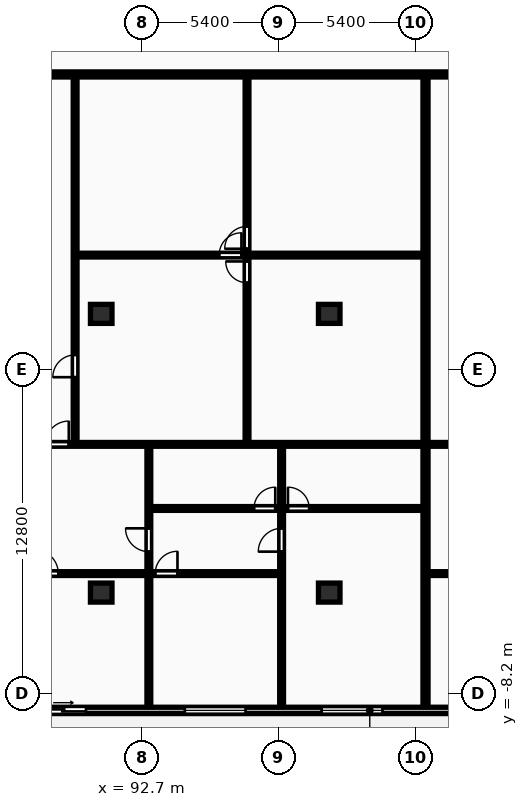
"""IFC4 building model, lengths in metres.
Left out: names, types, materials, properties, quantities, classifications, styles, units other than length and angle.
Written with IfcOpenShell. Run it as: python <this file> out.ifc"""

import sys

from ifc_helpers import new_model, si_unit, direction, frame, frame_2d, origin, origin_2d, place, context, subcontext, project, spatial, rectangle, extrude, element, fill, save


model = new_model("IFC4")
c1 = context("Model", 3, precision=1e-05, world=origin(), true_north=direction((0.0, 1.0)))
c2 = subcontext(c1, "Body", "Model", "MODEL_VIEW")
j1 = project(units=[si_unit("LENGTHUNIT", "METRE"), si_unit("PLANEANGLEUNIT", "RADIAN")], contexts=[c1])
p1 = place(None, origin())
s1 = spatial("IfcSite", under=j1, at=p1, CompositionType="ELEMENT")
p2 = place(p1, origin())
s2 = spatial("IfcBuilding", under=s1, at=p2, CompositionType="ELEMENT")
p3 = place(p2, frame((0.0, 0.0, 80.8)))
s3 = spatial("IfcBuildingStorey", under=s2, at=p3, CompositionType="ELEMENT", Elevation=80.8)
for number, where, z_axis, x_axis in (
    (1, (91.1, -4.2, 0.0), (0.0, 0.0, 1.0), (1.0, 0.0, 0.0)),
    (2, (91.1, 6.8, 0.0), (0.0, 0.0, 1.0), (1.0, 0.0, 0.0)),
    (3, (100.1, -4.2, 0.0), (0.0, 0.0, 1.0), (1.0, 0.0, 0.0)),
    (4, (100.1, 6.8, 0.0), (0.0, 0.0, 1.0), (1.0, 0.0, 0.0)),
):
    element("IfcColumn", number, at=place(p3, frame(where, z_axis=z_axis, x_axis=x_axis)), inside=s3, PredefinedType="COLUMN", context=c2, shape_type="SweptSolid", body=[
        extrude(rectangle(XDim=0.85, YDim=0.75, at=origin_2d()), origin(), (0.0, 0.0, 1.0), 3.25),
    ])
p4 = place(p3, frame((72.7, -8.85, 0.0), z_axis=(0.0, 0.0, 1.0), x_axis=(1.0, 0.0, 0.0)))
e5 = element("IfcWall", 5, at=p4, inside=s3, PredefinedType="STANDARD", context=c2, shape_type="SweptSolid", body=[
    extrude(rectangle(XDim=58.0, YDim=0.25, at=frame_2d((29.0, 0.0))), origin(), (0.0, 0.0, 1.0), 2.97),
])
p5 = place(p4, frame((2.92, 0.0, 0.0)))
e6 = element("IfcOpeningElement", 6, at=p5, cuts=e5, PredefinedType="OPENING", context=c2, shape_type="SweptSolid", body=[
    extrude(rectangle(XDim=1.8, YDim=2.2, at=frame_2d((0.9, 1.1))), frame((0.0, 0.135, 0.0), z_axis=(0.0, -1.0, 0.0), x_axis=(1.0, 0.0, 0.0)), (0.0, 0.0, 1.0), 0.27),
])
p6 = place(p4, frame((9.2, 0.0, 0.85)))
e7 = element("IfcOpeningElement", 7, at=p6, cuts=e5, PredefinedType="OPENING", context=c2, shape_type="SweptSolid", body=[
    extrude(rectangle(XDim=2.4, YDim=1.9, at=frame_2d((1.2, 0.95))), frame((0.0, 0.135, 0.0), z_axis=(0.0, -1.0, 0.0), x_axis=(1.0, 0.0, 0.0)), (0.0, 0.0, 1.0), 0.27),
])
p7 = place(p4, frame((21.7, 0.0, 0.85)))
e8 = element("IfcOpeningElement", 8, at=p7, cuts=e5, PredefinedType="OPENING", context=c2, shape_type="SweptSolid", body=[
    extrude(rectangle(XDim=2.4, YDim=1.9, at=frame_2d((1.2, 0.95))), frame((0.0, 0.135, 0.0), z_axis=(0.0, -1.0, 0.0), x_axis=(1.0, 0.0, 0.0)), (0.0, 0.0, 1.0), 0.27),
])
p8 = place(p4, frame((16.0, 0.0, 0.0)))
e9 = element("IfcOpeningElement", 9, at=p8, cuts=e5, PredefinedType="OPENING", context=c2, shape_type="SweptSolid", body=[
    extrude(rectangle(XDim=1.8, YDim=2.2, at=frame_2d((0.9, 1.1))), frame((0.0, 0.135, 0.0), z_axis=(0.0, -1.0, 0.0), x_axis=(1.0, 0.0, 0.0)), (0.0, 0.0, 1.0), 0.27),
])
p9 = place(p4, frame((27.1, 0.0, 0.85)))
e10 = element("IfcOpeningElement", 10, at=p9, cuts=e5, PredefinedType="OPENING", context=c2, shape_type="SweptSolid", body=[
    extrude(rectangle(XDim=2.4, YDim=1.9, at=frame_2d((1.2, 0.95))), frame((0.0, 0.135, 0.0), z_axis=(0.0, -1.0, 0.0), x_axis=(1.0, 0.0, 0.0)), (0.0, 0.0, 1.0), 0.27),
])
p10 = place(p4, frame((35.85, 0.0, 0.0)))
e11 = element("IfcOpeningElement", 11, at=p10, cuts=e5, PredefinedType="OPENING", context=c2, shape_type="SweptSolid", body=[
    extrude(rectangle(XDim=1.8, YDim=2.2, at=frame_2d((0.9, 1.1))), frame((0.0, 0.135, 0.0), z_axis=(0.0, -1.0, 0.0), x_axis=(1.0, 0.0, 0.0)), (0.0, 0.0, 1.0), 0.27),
])
p11 = place(p4, frame((42.93, 0.0, 0.85)))
e12 = element("IfcOpeningElement", 12, at=p11, cuts=e5, PredefinedType="OPENING", context=c2, shape_type="SweptSolid", body=[
    extrude(rectangle(XDim=1.8, YDim=1.8, at=frame_2d((0.9, 0.9))), frame((0.0, 0.135, 0.0), z_axis=(0.0, -1.0, 0.0), x_axis=(1.0, 0.0, 0.0)), (0.0, 0.0, 1.0), 0.27),
])
p12 = place(p4, frame((49.12, 0.0, 0.0)))
e13 = element("IfcOpeningElement", 13, at=p12, cuts=e5, PredefinedType="OPENING", context=c2, shape_type="SweptSolid", body=[
    extrude(rectangle(XDim=1.8, YDim=2.2, at=frame_2d((0.9, 1.1))), frame((0.0, 0.135, 0.0), z_axis=(0.0, -1.0, 0.0), x_axis=(1.0, 0.0, 0.0)), (0.0, 0.0, 1.0), 0.27),
])
p13 = place(p4, frame((54.9, 0.0, 0.85)))
e14 = element("IfcOpeningElement", 14, at=p13, cuts=e5, PredefinedType="OPENING", context=c2, shape_type="SweptSolid", body=[
    extrude(rectangle(XDim=2.4, YDim=1.9, at=frame_2d((1.2, 0.95))), frame((0.0, 0.135, 0.0), z_axis=(0.0, -1.0, 0.0), x_axis=(1.0, 0.0, 0.0)), (0.0, 0.0, 1.0), 0.27),
])
p14 = place(p3, frame((103.9, -8.7, 0.0), z_axis=(0.0, 0.0, 1.0), x_axis=(0.0, 1.0, 0.0)))
e15 = element("IfcWall", 15, at=p14, inside=s3, PredefinedType="PARTITIONING", context=c2, shape_type="SweptSolid", body=[
    extrude(rectangle(XDim=24.87, YDim=0.2, at=frame_2d((12.435, 0.0))), origin(), (0.0, 0.0, 1.0), 2.97),
])
p15 = place(p3, frame((96.855, 1.69, 0.0), z_axis=(0.0, 0.0, 1.0), x_axis=(0.0, 1.0, 0.0)))
e16 = element("IfcWall", 16, at=p15, inside=s3, PredefinedType="PARTITIONING", context=c2, shape_type="SweptSolid", body=[
    extrude(rectangle(XDim=14.5, YDim=0.15, at=frame_2d((7.25, 0.0))), origin(), (0.0, 0.0, 1.0), 2.97),
])
p16 = place(p15, frame((6.34, 0.0, 0.0)))
e17 = element("IfcOpeningElement", 17, at=p16, cuts=e16, PredefinedType="OPENING", context=c2, shape_type="SweptSolid", body=[
    extrude(rectangle(XDim=0.84, YDim=2.04, at=frame_2d((0.42, 1.02))), frame((0.0, 0.085, 0.0), z_axis=(0.0, -1.0, 0.0), x_axis=(1.0, 0.0, 0.0)), (0.0, 0.0, 1.0), 0.17),
])
p17 = place(p15, frame((7.68, 0.0, 0.0)))
e18 = element("IfcOpeningElement", 18, at=p17, cuts=e16, PredefinedType="OPENING", context=c2, shape_type="SweptSolid", body=[
    extrude(rectangle(XDim=0.88, YDim=2.06, at=frame_2d((0.44, 1.03))), frame((0.0, 0.085, 0.0), z_axis=(0.0, -1.0, 0.0), x_axis=(1.0, 0.0, 0.0)), (0.0, 0.0, 1.0), 0.17),
])
p18 = place(p3, frame((90.13, 9.12, 0.0), z_axis=(0.0, 0.0, 1.0), x_axis=(1.0, 0.0, 0.0)))
e19 = element("IfcWall", 19, at=p18, inside=s3, PredefinedType="PARTITIONING", context=c2, shape_type="SweptSolid", body=[
    extrude(rectangle(XDim=13.69, YDim=0.15, at=frame_2d((6.845, 0.0))), origin(), (0.0, 0.0, 1.0), 2.97),
])
p19 = place(p18, frame((5.625, 0.0, 0.0)))
e20 = element("IfcOpeningElement", 20, at=p19, cuts=e19, PredefinedType="OPENING", context=c2, shape_type="SweptSolid", body=[
    extrude(rectangle(XDim=0.88, YDim=2.06, at=frame_2d((0.44, 1.03))), frame((0.0, 0.085, 0.0), z_axis=(0.0, -1.0, 0.0), x_axis=(1.0, 0.0, 0.0)), (0.0, 0.0, 1.0), 0.17),
])
p20 = place(p3, frame((90.07, 1.69, 0.0), z_axis=(0.0, 0.0, 1.0), x_axis=(0.0, 1.0, 0.0)))
e21 = element("IfcWall", 21, at=p20, inside=s3, PredefinedType="PARTITIONING", context=c2, shape_type="SweptSolid", body=[
    extrude(rectangle(XDim=14.5, YDim=0.15, at=frame_2d((7.25, 0.0))), origin(), (0.0, 0.0, 1.0), 2.97),
])
p21 = place(p20, frame((2.611, 0.0, 0.0)))
e22 = element("IfcOpeningElement", 22, at=p21, cuts=e21, PredefinedType="OPENING", context=c2, shape_type="SweptSolid", body=[
    extrude(rectangle(XDim=0.88, YDim=2.06, at=frame_2d((0.44, 1.03))), frame((0.0, 0.085, 0.0), z_axis=(0.0, -1.0, 0.0), x_axis=(1.0, 0.0, 0.0)), (0.0, 0.0, 1.0), 0.17),
])
p22 = place(p3, frame((92.98, -8.7, 0.0), z_axis=(0.0, 0.0, 1.0), x_axis=(0.0, 1.0, 0.0)))
e23 = element("IfcWall", 23, at=p22, inside=s3, PredefinedType="PARTITIONING", context=c2, shape_type="SweptSolid", body=[
    extrude(rectangle(XDim=10.31, YDim=0.15, at=frame_2d((5.155, 0.0))), origin(), (0.0, 0.0, 1.0), 2.97),
])
p23 = place(p22, frame((6.116, 0.0, 0.0)))
e24 = element("IfcOpeningElement", 24, at=p23, cuts=e23, PredefinedType="OPENING", context=c2, shape_type="SweptSolid", body=[
    extrude(rectangle(XDim=0.92, YDim=2.08, at=frame_2d((0.46, 1.04))), frame((0.0, 0.085, 0.0), z_axis=(0.0, -1.0, 0.0), x_axis=(1.0, 0.0, 0.0)), (0.0, 0.0, 1.0), 0.17),
])
p24 = place(p3, frame((98.22, -0.86, 0.0), z_axis=(0.0, 0.0, 1.0), x_axis=(0.0, 1.0, 0.0)))
e25 = element("IfcWall", 25, at=p24, inside=s3, PredefinedType="PARTITIONING", context=c2, shape_type="SweptSolid", body=[
    extrude(rectangle(XDim=2.47, YDim=0.15, at=frame_2d((1.235, 0.0))), origin(), (0.0, 0.0, 1.0), 2.97),
])
p25 = place(p3, frame((98.22, -8.7, 0.0), z_axis=(0.0, 0.0, 1.0), x_axis=(0.0, 1.0, 0.0)))
e26 = element("IfcWall", 26, at=p25, inside=s3, PredefinedType="PARTITIONING", context=c2, shape_type="SweptSolid", body=[
    extrude(rectangle(XDim=7.8, YDim=0.15, at=frame_2d((3.9, 0.0))), origin(), (0.0, 0.0, 1.0), 2.97),
])
p26 = place(p25, frame((6.116, 0.0, 0.0)))
e27 = element("IfcOpeningElement", 27, at=p26, cuts=e26, PredefinedType="OPENING", context=c2, shape_type="SweptSolid", body=[
    extrude(rectangle(XDim=0.92, YDim=2.08, at=frame_2d((0.46, 1.04))), frame((0.0, 0.085, 0.0), z_axis=(0.0, -1.0, 0.0), x_axis=(1.0, 0.0, 0.0)), (0.0, 0.0, 1.0), 0.17),
])
p27 = place(p3, frame((93.02, -0.88, 0.0), z_axis=(0.0, 0.0, 1.0), x_axis=(1.0, 0.0, 0.0)))
e28 = element("IfcWall", 28, at=p27, inside=s3, PredefinedType="PARTITIONING", context=c2, shape_type="SweptSolid", body=[
    extrude(rectangle(XDim=10.8, YDim=0.15, at=frame_2d((5.4, 0.0))), origin(), (0.0, 0.0, 1.0), 2.97),
])
p28 = place(p27, frame((4.11, 0.0, 0.0)))
e29 = element("IfcOpeningElement", 29, at=p28, cuts=e28, PredefinedType="OPENING", context=c2, shape_type="SweptSolid", body=[
    extrude(rectangle(XDim=0.84, YDim=2.04, at=frame_2d((0.42, 1.02))), frame((0.0, 0.085, 0.0), z_axis=(0.0, -1.0, 0.0), x_axis=(1.0, 0.0, 0.0)), (0.0, 0.0, 1.0), 0.17),
])
p29 = place(p27, frame((5.45, 0.0, 0.0)))
e30 = element("IfcOpeningElement", 30, at=p29, cuts=e28, PredefinedType="OPENING", context=c2, shape_type="SweptSolid", body=[
    extrude(rectangle(XDim=0.84, YDim=2.04, at=frame_2d((0.42, 1.02))), frame((0.0, 0.085, 0.0), z_axis=(0.0, -1.0, 0.0), x_axis=(1.0, 0.0, 0.0)), (0.0, 0.0, 1.0), 0.17),
])
p30 = place(p3, frame((86.18, 1.65, 0.0), z_axis=(0.0, 0.0, 1.0), x_axis=(1.0, 0.0, 0.0)))
e31 = element("IfcWall", 31, at=p30, inside=s3, PredefinedType="PARTITIONING", context=c2, shape_type="SweptSolid", body=[
    extrude(rectangle(XDim=17.64, YDim=0.15, at=frame_2d((8.82, 0.0))), origin(), (0.0, 0.0, 1.0), 2.97),
])
p31 = place(p30, frame((2.72, 0.0, 0.0)))
e32 = element("IfcOpeningElement", 32, at=p31, cuts=e31, PredefinedType="OPENING", context=c2, shape_type="SweptSolid", body=[
    extrude(rectangle(XDim=0.92, YDim=2.08, at=frame_2d((0.46, 1.04))), frame((0.0, 0.085, 0.0), z_axis=(0.0, -1.0, 0.0), x_axis=(1.0, 0.0, 0.0)), (0.0, 0.0, 1.0), 0.17),
])
p32 = place(p3, frame((86.18, -3.45, 0.0), z_axis=(0.0, 0.0, 1.0), x_axis=(1.0, 0.0, 0.0)))
e33 = element("IfcWall", 33, at=p32, inside=s3, PredefinedType="PARTITIONING", context=c2, shape_type="SweptSolid", body=[
    extrude(rectangle(XDim=12.04, YDim=0.15, at=frame_2d((6.02, 0.0))), origin(), (0.0, 0.0, 1.0), 2.97),
])
p33 = place(p32, frame((2.287, 0.0, 0.0)))
e34 = element("IfcOpeningElement", 34, at=p33, cuts=e33, PredefinedType="OPENING", context=c2, shape_type="SweptSolid", body=[
    extrude(rectangle(XDim=0.94, YDim=2.1, at=frame_2d((0.47, 1.05))), frame((0.0, 0.085, 0.0), z_axis=(0.0, -1.0, 0.0), x_axis=(1.0, 0.0, 0.0)), (0.0, 0.0, 1.0), 0.17),
])
p34 = place(p32, frame((7.05, 0.0, 0.0)))
e35 = element("IfcOpeningElement", 35, at=p34, cuts=e33, PredefinedType="OPENING", context=c2, shape_type="SweptSolid", body=[
    extrude(rectangle(XDim=0.88, YDim=2.06, at=frame_2d((0.44, 1.03))), frame((0.0, 0.085, 0.0), z_axis=(0.0, -1.0, 0.0), x_axis=(1.0, 0.0, 0.0)), (0.0, 0.0, 1.0), 0.17),
])
p35 = place(p3, frame((103.98, 1.65, 0.0), z_axis=(0.0, 0.0, 1.0), x_axis=(1.0, 0.0, 0.0)))
e36 = element("IfcWall", 36, at=p35, inside=s3, PredefinedType="PARTITIONING", context=c2, shape_type="SweptSolid", body=[
    extrude(rectangle(XDim=14.24, YDim=0.15, at=frame_2d((7.12, 0.0))), origin(), (0.0, 0.0, 1.0), 2.97),
])
p36 = place(p35, frame((2.72, 0.0, 0.0)))
e37 = element("IfcOpeningElement", 37, at=p36, cuts=e36, PredefinedType="OPENING", context=c2, shape_type="SweptSolid", body=[
    extrude(rectangle(XDim=0.92, YDim=2.08, at=frame_2d((0.46, 1.04))), frame((0.0, 0.085, 0.0), z_axis=(0.0, -1.0, 0.0), x_axis=(1.0, 0.0, 0.0)), (0.0, 0.0, 1.0), 0.17),
])
p37 = place(p3, frame((103.98, -3.45, 0.0), z_axis=(0.0, 0.0, 1.0), x_axis=(1.0, 0.0, 0.0)))
e38 = element("IfcWall", 38, at=p37, inside=s3, PredefinedType="PARTITIONING", context=c2, shape_type="SweptSolid", body=[
    extrude(rectangle(XDim=14.24, YDim=0.15, at=frame_2d((7.12, 0.0))), origin(), (0.0, 0.0, 1.0), 2.97),
])
p38 = place(p37, frame((6.872, 0.0, 0.0)))
e39 = element("IfcOpeningElement", 39, at=p38, cuts=e38, PredefinedType="OPENING", context=c2, shape_type="SweptSolid", body=[
    extrude(rectangle(XDim=0.94, YDim=2.1, at=frame_2d((0.47, 1.05))), frame((0.0, 0.085, 0.0), z_axis=(0.0, -1.0, 0.0), x_axis=(1.0, 0.0, 0.0)), (0.0, 0.0, 1.0), 0.17),
])
p39 = place(p3, frame((72.7, 16.25, 0.0), z_axis=(0.0, 0.0, 1.0), x_axis=(1.0, 0.0, 0.0)))
e40 = element("IfcWall", 40, at=p39, inside=s3, PredefinedType="PARTITIONING", context=c2, shape_type="SweptSolid", body=[
    extrude(rectangle(XDim=58.0, YDim=0.2, at=frame_2d((29.0, 0.0))), origin(), (0.0, 0.0, 1.0), 2.97),
])
p40 = place(p39, frame((2.77, 0.0, 0.0)))
e41 = element("IfcOpeningElement", 41, at=p40, cuts=e40, PredefinedType="OPENING", context=c2, shape_type="SweptSolid", body=[
    extrude(rectangle(XDim=0.95, YDim=2.15, at=frame_2d((0.475, 1.075))), frame((0.0, 0.11, 0.0), z_axis=(0.0, -1.0, 0.0), x_axis=(1.0, 0.0, 0.0)), (0.0, 0.0, 1.0), 0.22),
])
p41 = place(p39, frame((15.445, 0.0, 0.0)))
e42 = element("IfcOpeningElement", 42, at=p41, cuts=e40, PredefinedType="OPENING", context=c2, shape_type="SweptSolid", body=[
    extrude(rectangle(XDim=0.95, YDim=2.15, at=frame_2d((0.475, 1.075))), frame((0.0, 0.11, 0.0), z_axis=(0.0, -1.0, 0.0), x_axis=(1.0, 0.0, 0.0)), (0.0, 0.0, 1.0), 0.22),
])
p42 = place(p39, frame((33.245, 0.0, 0.0)))
e43 = element("IfcOpeningElement", 43, at=p42, cuts=e40, PredefinedType="OPENING", context=c2, shape_type="SweptSolid", body=[
    extrude(rectangle(XDim=0.95, YDim=2.15, at=frame_2d((0.475, 1.075))), frame((0.0, 0.11, 0.0), z_axis=(0.0, -1.0, 0.0), x_axis=(1.0, 0.0, 0.0)), (0.0, 0.0, 1.0), 0.22),
])
p43 = place(p39, frame((47.645, 0.0, 0.0)))
e44 = element("IfcOpeningElement", 44, at=p43, cuts=e40, PredefinedType="OPENING", context=c2, shape_type="SweptSolid", body=[
    extrude(rectangle(XDim=0.95, YDim=2.15, at=frame_2d((0.475, 1.075))), frame((0.0, 0.11, 0.0), z_axis=(0.0, -1.0, 0.0), x_axis=(1.0, 0.0, 0.0)), (0.0, 0.0, 1.0), 0.22),
])
p44 = place(p7, origin())
e45 = element("IfcWindow", 45, at=p44, inside=s3, PartitioningType="DOUBLE_PANEL_VERTICAL", PredefinedType="WINDOW", context=c2, shape_type="SweptSolid", body=[
    extrude(rectangle(XDim=2.4, YDim=1.9, at=frame_2d((1.2, 0.95))), frame((0.0, 0.03, 0.0), z_axis=(0.0, -1.0, 0.0), x_axis=(1.0, 0.0, 0.0)), (0.0, 0.0, 1.0), 0.06),
])
fill(e8, e45)
p45 = place(p8, origin())
e46 = element("IfcDoor", 46, at=p45, inside=s3, OperationType="SLIDING_TO_RIGHT", PredefinedType="DOOR", context=c2, shape_type="SweptSolid", body=[
    extrude(rectangle(XDim=1.8, YDim=2.2, at=frame_2d((0.9, 1.1))), frame((0.0, 0.025, 0.0), z_axis=(0.0, -1.0, 0.0), x_axis=(1.0, 0.0, 0.0)), (0.0, 0.0, 1.0), 0.05),
])
fill(e9, e46)
p46 = place(p9, origin())
e47 = element("IfcWindow", 47, at=p46, inside=s3, PartitioningType="DOUBLE_PANEL_VERTICAL", PredefinedType="WINDOW", context=c2, shape_type="SweptSolid", body=[
    extrude(rectangle(XDim=2.4, YDim=1.9, at=frame_2d((1.2, 0.95))), frame((0.0, 0.03, 0.0), z_axis=(0.0, -1.0, 0.0), x_axis=(1.0, 0.0, 0.0)), (0.0, 0.0, 1.0), 0.06),
])
fill(e10, e47)
p47 = place(p16, origin())
e48 = element("IfcDoor", 48, at=p47, inside=s3, OperationType="SINGLE_SWING_RIGHT", PredefinedType="DOOR", context=c2, shape_type="SweptSolid", body=[
    extrude(rectangle(XDim=0.84, YDim=2.04, at=frame_2d((0.42, 1.02))), frame((0.0, 0.025, 0.0), z_axis=(0.0, -1.0, 0.0), x_axis=(1.0, 0.0, 0.0)), (0.0, 0.0, 1.0), 0.05),
])
fill(e17, e48)
p48 = place(p17, origin())
e49 = element("IfcDoor", 49, at=p48, inside=s3, OperationType="SINGLE_SWING_LEFT", PredefinedType="DOOR", context=c2, shape_type="SweptSolid", body=[
    extrude(rectangle(XDim=0.88, YDim=2.06, at=frame_2d((0.44, 1.03))), frame((0.0, 0.025, 0.0), z_axis=(0.0, -1.0, 0.0), x_axis=(1.0, 0.0, 0.0)), (0.0, 0.0, 1.0), 0.05),
])
fill(e18, e49)
p49 = place(p19, origin())
e50 = element("IfcDoor", 50, at=p49, inside=s3, OperationType="SINGLE_SWING_RIGHT", PredefinedType="DOOR", context=c2, shape_type="SweptSolid", body=[
    extrude(rectangle(XDim=0.88, YDim=2.06, at=frame_2d((0.44, 1.03))), frame((0.0, 0.025, 0.0), z_axis=(0.0, -1.0, 0.0), x_axis=(1.0, 0.0, 0.0)), (0.0, 0.0, 1.0), 0.05),
])
fill(e20, e50)
p50 = place(p21, origin())
e51 = element("IfcDoor", 51, at=p50, inside=s3, OperationType="SINGLE_SWING_LEFT", PredefinedType="DOOR", context=c2, shape_type="SweptSolid", body=[
    extrude(rectangle(XDim=0.88, YDim=2.06, at=frame_2d((0.44, 1.03))), frame((0.0, 0.025, 0.0), z_axis=(0.0, -1.0, 0.0), x_axis=(1.0, 0.0, 0.0)), (0.0, 0.0, 1.0), 0.05),
])
fill(e22, e51)
p51 = place(p23, origin())
e52 = element("IfcDoor", 52, at=p51, inside=s3, OperationType="SINGLE_SWING_RIGHT", PredefinedType="DOOR", context=c2, shape_type="SweptSolid", body=[
    extrude(rectangle(XDim=0.92, YDim=2.08, at=frame_2d((0.46, 1.04))), frame((0.0, 0.025, 0.0), z_axis=(0.0, -1.0, 0.0), x_axis=(1.0, 0.0, 0.0)), (0.0, 0.0, 1.0), 0.05),
])
fill(e24, e52)
p52 = place(p26, origin())
e53 = element("IfcDoor", 53, at=p52, inside=s3, OperationType="SINGLE_SWING_LEFT", PredefinedType="DOOR", context=c2, shape_type="SweptSolid", body=[
    extrude(rectangle(XDim=0.92, YDim=2.08, at=frame_2d((0.46, 1.04))), frame((0.0, 0.025, 0.0), z_axis=(0.0, -1.0, 0.0), x_axis=(1.0, 0.0, 0.0)), (0.0, 0.0, 1.0), 0.05),
])
fill(e27, e53)
p53 = place(p28, origin())
e54 = element("IfcDoor", 54, at=p53, inside=s3, OperationType="SINGLE_SWING_RIGHT", PredefinedType="DOOR", context=c2, shape_type="SweptSolid", body=[
    extrude(rectangle(XDim=0.84, YDim=2.04, at=frame_2d((0.42, 1.02))), frame((0.0, 0.025, 0.0), z_axis=(0.0, -1.0, 0.0), x_axis=(1.0, 0.0, 0.0)), (0.0, 0.0, 1.0), 0.05),
])
fill(e29, e54)
p54 = place(p29, origin())
e55 = element("IfcDoor", 55, at=p54, inside=s3, OperationType="SINGLE_SWING_LEFT", PredefinedType="DOOR", context=c2, shape_type="SweptSolid", body=[
    extrude(rectangle(XDim=0.84, YDim=2.04, at=frame_2d((0.42, 1.02))), frame((0.0, 0.025, 0.0), z_axis=(0.0, -1.0, 0.0), x_axis=(1.0, 0.0, 0.0)), (0.0, 0.0, 1.0), 0.05),
])
fill(e30, e55)
p55 = place(p31, origin())
e56 = element("IfcDoor", 56, at=p55, inside=s3, OperationType="SINGLE_SWING_RIGHT", PredefinedType="DOOR", context=c2, shape_type="SweptSolid", body=[
    extrude(rectangle(XDim=0.92, YDim=2.08, at=frame_2d((0.46, 1.04))), frame((0.0, 0.025, 0.0), z_axis=(0.0, -1.0, 0.0), x_axis=(1.0, 0.0, 0.0)), (0.0, 0.0, 1.0), 0.05),
])
fill(e32, e56)
p56 = place(p33, origin())
e57 = element("IfcDoor", 57, at=p56, inside=s3, OperationType="SINGLE_SWING_LEFT", PredefinedType="DOOR", context=c2, shape_type="SweptSolid", body=[
    extrude(rectangle(XDim=0.94, YDim=2.1, at=frame_2d((0.47, 1.05))), frame((0.0, 0.025, 0.0), z_axis=(0.0, -1.0, 0.0), x_axis=(1.0, 0.0, 0.0)), (0.0, 0.0, 1.0), 0.05),
])
fill(e34, e57)
p57 = place(p34, origin())
e58 = element("IfcDoor", 58, at=p57, inside=s3, OperationType="SINGLE_SWING_RIGHT", PredefinedType="DOOR", context=c2, shape_type="SweptSolid", body=[
    extrude(rectangle(XDim=0.88, YDim=2.06, at=frame_2d((0.44, 1.03))), frame((0.0, 0.025, 0.0), z_axis=(0.0, -1.0, 0.0), x_axis=(1.0, 0.0, 0.0)), (0.0, 0.0, 1.0), 0.05),
])
fill(e35, e58)
save(model, sys.argv[1])
